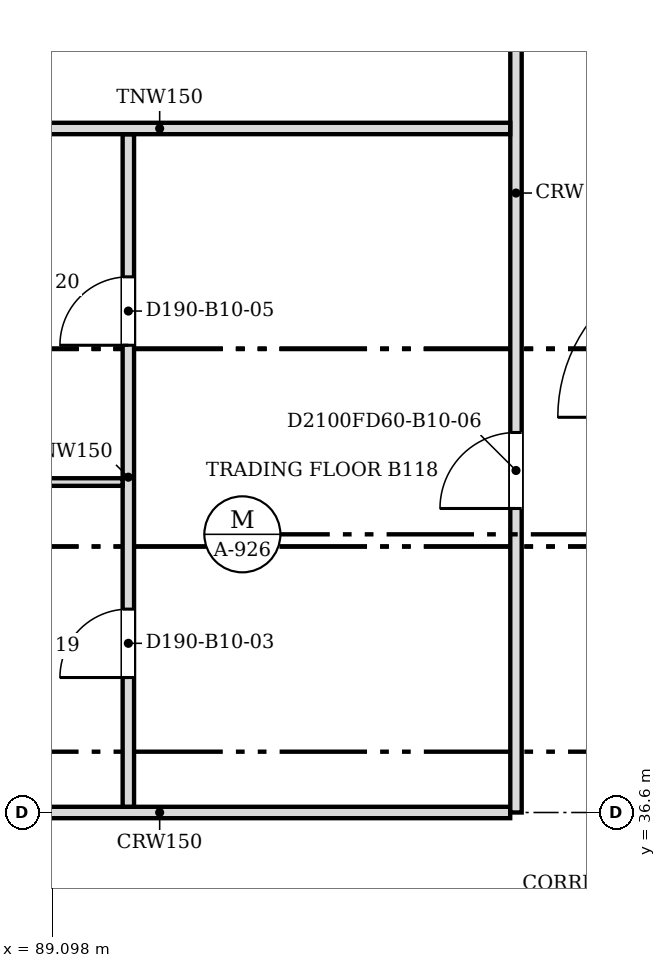
"""IFC4 building model, lengths in metres.
Left out: names, types, materials, properties, quantities, classifications, styles, units other than length and angle.
Written with IfcOpenShell. Run it as: python <this file> out.ifc"""

import sys

from ifc_helpers import new_model, si_unit, direction, frame, frame_2d, origin, place, context, subcontext, project, spatial, rectangle, extrude, source, transform, mapped, element, fill, save


model = new_model("IFC4")
c1 = context("Model", 3, precision=1e-05, world=origin(), true_north=direction((0.0, 1.0)))
c2 = subcontext(c1, "Body", "Model", "MODEL_VIEW")
j1 = project(units=[si_unit("LENGTHUNIT", "METRE"), si_unit("PLANEANGLEUNIT", "RADIAN")], contexts=[c1])
p1 = place(None, origin())
s1 = spatial("IfcSite", under=j1, at=p1, CompositionType="ELEMENT")
p2 = place(p1, origin())
s2 = spatial("IfcBuilding", under=s1, at=p2, CompositionType="ELEMENT")
p3 = place(p2, frame((0.0, 0.0, 95.2)))
s3 = spatial("IfcBuildingStorey", under=s2, at=p3, CompositionType="ELEMENT", Elevation=95.2)
p4 = place(p3, frame((85.9, 36.6, 0.0), z_axis=(0.0, 0.0, 1.0), x_axis=(1.0, 0.0, 0.0)))
e1 = element("IfcWall", 1, at=p4, inside=s3, PredefinedType="PARTITIONING", context=c2, shape_type="SweptSolid", body=[
    extrude(rectangle(XDim=9.224, YDim=0.15, at=frame_2d((4.612, 0.0))), origin(), (0.0, 0.0, 1.0), 3.067),
])
p5 = place(p3, frame((95.2, 36.6, 0.0), z_axis=(0.0, 0.0, 1.0), x_axis=(0.0, 1.0, 0.0)))
e2 = element("IfcWall", 2, at=p5, inside=s3, PredefinedType="PARTITIONING", context=c2, shape_type="SweptSolid", body=[
    extrude(rectangle(XDim=14.6, YDim=0.15, at=frame_2d((7.3, 0.0))), origin(), (0.0, 0.0, 1.0), 3.067),
])
m1 = source(origin(), c2, "Body", "SweptSolid", [
    extrude(rectangle(XDim=1.0, YDim=2.1, at=frame_2d((0.5, 1.05))), frame((0.0, 0.085, 0.0), z_axis=(0.0, -1.0, 0.0), x_axis=(1.0, 0.0, 0.0)), (0.0, 0.0, 1.0), 0.17),
])
p6 = place(p5, frame((11.301, 0.0, 0.0)))
e3 = element("IfcOpeningElement", 3, at=p6, cuts=e2, PredefinedType="OPENING", context=c2, shape_type="MappedRepresentation", body=[
    mapped(m1, transform((0.0, 0.0, 0.0), scale=1.0)),
])
p7 = place(p5, frame((4.0, 0.0, 0.0)))
e4 = element("IfcOpeningElement", 4, at=p7, cuts=e2, PredefinedType="OPENING", context=c2, shape_type="MappedRepresentation", body=[
    mapped(m1, transform((0.0, 0.0, 0.0), scale=1.0)),
])
p8 = place(p3, frame((90.1, 36.676, 0.0), z_axis=(0.0, 0.0, 1.0), x_axis=(0.0, 1.0, 0.0)))
e5 = element("IfcWall", 5, at=p8, inside=s3, PredefinedType="PARTITIONING", context=c2, shape_type="SweptSolid", body=[
    extrude(rectangle(XDim=8.848, YDim=0.15, at=frame_2d((4.424, 0.0))), origin(), (0.0, 0.0, 1.0), 3.067),
])
m2 = source(origin(), c2, "Body", "SweptSolid", [
    extrude(rectangle(XDim=0.9, YDim=2.1, at=frame_2d((0.45, 1.05))), frame((0.0, 0.085, 0.0), z_axis=(0.0, -1.0, 0.0), x_axis=(1.0, 0.0, 0.0)), (0.0, 0.0, 1.0), 0.17),
])
p9 = place(p8, frame((1.7, 0.0, 0.0)))
e6 = element("IfcOpeningElement", 6, at=p9, cuts=e5, PredefinedType="OPENING", context=c2, shape_type="MappedRepresentation", body=[
    mapped(m2, transform((0.0, 0.0, 0.0), scale=1.0)),
])
p10 = place(p8, frame((6.072, 0.0, 0.0)))
e7 = element("IfcOpeningElement", 7, at=p10, cuts=e5, PredefinedType="OPENING", context=c2, shape_type="MappedRepresentation", body=[
    mapped(m2, transform((0.0, 0.0, 0.0), scale=1.0)),
])
p11 = place(p3, frame((85.9, 40.948, 0.0), z_axis=(0.0, 0.0, 1.0), x_axis=(1.0, 0.0, 0.0)))
e8 = element("IfcWall", 8, at=p11, inside=s3, PredefinedType="PARTITIONING", context=c2, shape_type="SweptSolid", body=[
    extrude(rectangle(XDim=4.124, YDim=0.1, at=frame_2d((2.062, 0.0))), origin(), (0.0, 0.0, 1.0), 3.067),
])
p12 = place(p3, frame((85.9, 45.6, 0.0), z_axis=(0.0, 0.0, 1.0), x_axis=(1.0, 0.0, 0.0)))
e9 = element("IfcWall", 9, at=p12, inside=s3, PredefinedType="PARTITIONING", context=c2, shape_type="SweptSolid", body=[
    extrude(rectangle(XDim=9.224, YDim=0.15, at=frame_2d((4.612, 0.0))), origin(), (0.0, 0.0, 1.0), 3.067),
])
m3 = source(origin(), c2, "Body", "SweptSolid", [
    extrude(rectangle(XDim=0.9, YDim=2.1, at=frame_2d((0.45, 1.05))), frame((0.0, 0.025, 0.0), z_axis=(0.0, -1.0, 0.0), x_axis=(1.0, 0.0, 0.0)), (0.0, 0.0, 1.0), 0.05),
])
p13 = place(p9, origin())
e10 = element("IfcDoor", 10, at=p13, inside=s3, OperationType="SINGLE_SWING_LEFT", PredefinedType="DOOR", context=c2, shape_type="MappedRepresentation", body=[
    mapped(m3, transform((0.0, 0.0, 0.0), scale=1.0)),
])
fill(e6, e10)
p14 = place(p10, origin())
e11 = element("IfcDoor", 11, at=p14, inside=s3, OperationType="SINGLE_SWING_LEFT", PredefinedType="DOOR", context=c2, shape_type="MappedRepresentation", body=[
    mapped(m3, transform((0.0, 0.0, 0.0), scale=1.0)),
])
fill(e7, e11)
m4 = source(origin(), c2, "Body", "SweptSolid", [
    extrude(rectangle(XDim=1.0, YDim=2.1, at=frame_2d((0.5, 1.05))), frame((0.0, 0.025, 0.0), z_axis=(0.0, -1.0, 0.0), x_axis=(1.0, 0.0, 0.0)), (0.0, 0.0, 1.0), 0.05),
])
p15 = place(p7, origin())
e12 = element("IfcDoor", 12, at=p15, inside=s3, OperationType="SINGLE_SWING_LEFT", PredefinedType="DOOR", context=c2, shape_type="MappedRepresentation", body=[
    mapped(m4, transform((0.0, 0.0, 0.0), scale=1.0)),
])
fill(e4, e12)
save(model, sys.argv[1])
